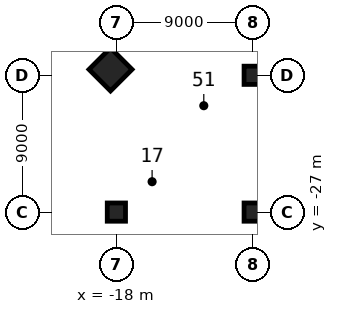
"""IFC4 building model, lengths in metres.
Left out: names, types, materials, properties, quantities, classifications, styles, units other than length and angle.
Written with IfcOpenShell. Run it as: python <this file> out.ifc"""

import sys

from ifc_helpers import new_model, si_unit, direction, frame, origin, origin_2d, place, context, subcontext, project, spatial, rectangle, extrude, element, save


model = new_model("IFC4")
c1 = context("Model", 3, precision=1e-05, world=origin(), true_north=direction((0.0, 1.0)))
c2 = subcontext(c1, "Body", "Model", "MODEL_VIEW")
j1 = project(units=[si_unit("LENGTHUNIT", "METRE"), si_unit("PLANEANGLEUNIT", "RADIAN")], contexts=[c1])
p1 = place(None, origin())
s1 = spatial("IfcSite", under=j1, at=p1, CompositionType="ELEMENT")
p2 = place(p1, origin())
s2 = spatial("IfcBuilding", under=s1, at=p2, CompositionType="ELEMENT")
p3 = place(p2, frame((0.0, 0.0, -9.0)))
s3 = spatial("IfcBuildingStorey", under=s2, at=p3, CompositionType="ELEMENT", Elevation=-9.0)
for number, where, z_axis, x_axis in (
    (1, (-18.0, -27.0, 0.0), (0.0, 0.0, 1.0), (1.0, 0.0, 0.0)),
    (2, (-9.0, -27.0, 0.0), (0.0, 0.0, 1.0), (1.0, 0.0, 0.0)),
    (3, (-9.0, -18.0, 0.0), (0.0, 0.0, 1.0), (1.0, 0.0, 0.0)),
):
    element("IfcColumn", number, at=place(p3, frame(where, z_axis=z_axis, x_axis=x_axis)), inside=s3, PredefinedType="COLUMN", context=c2, shape_type="SweptSolid", body=[
        extrude(rectangle(XDim=1.2, YDim=1.2, at=origin_2d()), origin(), (0.0, 0.0, 1.0), 4.5),
    ])
p4 = place(p3, frame((-18.386, -17.614, 0.0), z_axis=(0.0, 0.0, 1.0), x_axis=(0.707106781187, -0.707106781187, 0.0)))
e4 = element("IfcColumn", 4, at=p4, inside=s3, PredefinedType="COLUMN", context=c2, shape_type="SweptSolid", body=[
    extrude(rectangle(XDim=2.0, YDim=2.0, at=origin_2d()), origin(), (0.0, 0.0, 1.0), 4.5),
])
save(model, sys.argv[1])
